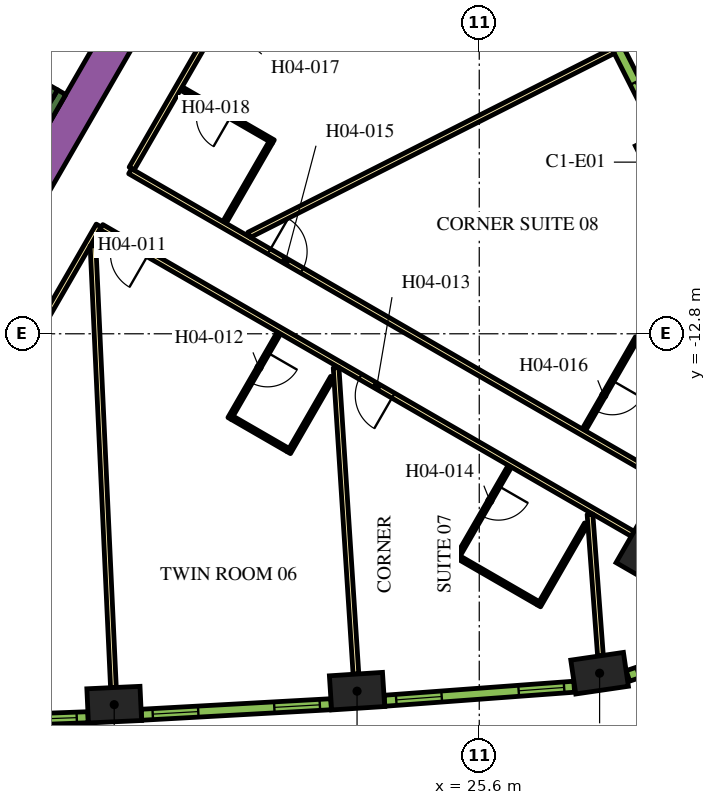
"""IFC4 building model, lengths in metres.
Left out: names, types, materials, properties, quantities, classifications, styles, units other than length and angle.
Written with IfcOpenShell. Run it as: python <this file> out.ifc"""

import sys

from ifc_helpers import new_model, si_unit, direction, frame, frame_2d, origin, origin_2d, place, context, subcontext, project, spatial, rectangle, extrude, element, fill, save


model = new_model("IFC4")
c1 = context("Model", 3, precision=1e-05, world=origin(), true_north=direction((0.0, 1.0)))
c2 = subcontext(c1, "Body", "Model", "MODEL_VIEW")
j1 = project(units=[si_unit("LENGTHUNIT", "METRE"), si_unit("PLANEANGLEUNIT", "RADIAN")], contexts=[c1])
p1 = place(None, origin())
s1 = spatial("IfcSite", under=j1, at=p1, CompositionType="ELEMENT")
p2 = place(p1, origin())
s2 = spatial("IfcBuilding", under=s1, at=p2, CompositionType="ELEMENT")
p3 = place(p2, frame((0.0, 0.0, 66.6)))
s3 = spatial("IfcBuildingStorey", under=s2, at=p3, CompositionType="ELEMENT", Elevation=66.6)
p4 = place(p3, frame((31.522, -18.199, 0.0), z_axis=(0.0, 0.0, 1.0), x_axis=(0.866025403784, -0.5, 0.0)))
e1 = element("IfcColumn", 1, at=p4, inside=s3, PredefinedType="COLUMN", context=c2, shape_type="SweptSolid", body=[
    extrude(rectangle(XDim=3.4, YDim=3.4, at=origin_2d()), origin(), (0.0, 0.0, 1.0), 3.9),
])
for number, where, z_axis, x_axis in (
    (2, (15.994, -22.558, 0.0), (0.0, 0.0, 1.0), (0.999, 0.046, 0.0)),
    (3, (22.385, -22.204, 0.0), (0.0, 0.0, 1.0), (0.998, 0.065, 0.0)),
    (4, (28.767, -21.731, 0.0), (0.0, 0.0, 1.0), (0.989, 0.145, 0.0)),
    (5, (30.421, -8.284, 0.0), (0.0, 0.0, 1.0), (-0.443, 0.897, 0.0)),
):
    element("IfcColumn", number, at=place(p3, frame(where, z_axis=z_axis, x_axis=x_axis)), inside=s3, PredefinedType="COLUMN", context=c2, shape_type="SweptSolid", body=[
        extrude(rectangle(XDim=1.4, YDim=0.9, at=origin_2d()), origin(), (0.0, 0.0, 1.0), 3.9),
    ])
p5 = place(p3, frame((11.695, -12.644, 0.0), z_axis=(0.0, 0.0, 1.0), x_axis=(0.500010229568, 0.86601949766, 0.0)))
e6 = element("IfcWall", 6, at=p5, inside=s3, PredefinedType="SOLIDWALL", context=c2, shape_type="SweptSolid", body=[
    extrude(rectangle(XDim=9.326, YDim=0.9, at=frame_2d((4.663, 0.0))), origin(), (0.0, 0.0, 1.0), 3.9),
])
p6 = place(p3, frame((12.885, -9.431, 0.0), z_axis=(0.0, 0.0, 1.0), x_axis=(0.500020560727, 0.866013532718, 0.0)))
e7 = element("IfcWall", 7, at=p6, inside=s3, PredefinedType="SOLIDWALL", context=c2, shape_type="SweptSolid", body=[
    extrude(rectangle(XDim=3.45, YDim=0.25, at=frame_2d((1.725, 0.0))), origin(), (0.0, 0.0, 1.0), 3.9),
])
p7 = place(p3, frame((8.334, -2.964, 0.0), z_axis=(0.0, 0.0, 1.0), x_axis=(0.866016039709, -0.500016218704, 0.0)))
e8 = element("IfcWall", 8, at=p7, inside=s3, PredefinedType="SOLIDWALL", context=c2, shape_type="SweptSolid", body=[
    extrude(rectangle(XDim=7.05, YDim=0.25, at=frame_2d((3.525, 0.0))), origin(), (0.0, 0.0, 1.0), 3.9),
])
p8 = place(p3, frame((16.412, -8.523, 0.0), z_axis=(0.0, 0.0, 1.0), x_axis=(0.866022197818, -0.500005552856, 0.0)))
e9 = element("IfcWall", 9, at=p8, inside=s3, PredefinedType="PARTITIONING", context=c2, shape_type="SweptSolid", body=[
    extrude(rectangle(XDim=16.224, YDim=0.15, at=frame_2d((8.112, 0.0))), origin(), (0.0, 0.0, 1.0), 2.75),
])
p9 = place(p8, frame((4.223, 0.0, 0.0)))
e10 = element("IfcOpeningElement", 10, at=p9, cuts=e9, PredefinedType="OPENING", context=c2, shape_type="SweptSolid", body=[
    extrude(rectangle(XDim=1.0, YDim=2.1, at=frame_2d((0.5, 1.05))), frame((0.0, 0.085, 0.0), z_axis=(0.0, -1.0, 0.0), x_axis=(1.0, 0.0, 0.0)), (0.0, 0.0, 1.0), 0.17),
])
p10 = place(p3, frame((19.081, -3.9, 0.0), z_axis=(0.0, 0.0, 1.0), x_axis=(-0.499974327079, -0.866040225545, 0.0)))
e11 = element("IfcWall", 11, at=p10, inside=s3, PredefinedType="PARTITIONING", context=c2, shape_type="SweptSolid", body=[
    extrude(rectangle(XDim=5.258, YDim=0.15, at=frame_2d((2.629, 0.0))), origin(), (0.0, 0.0, 1.0), 2.75),
])
p11 = place(p10, frame((0.18, 0.0, 0.0)))
e12 = element("IfcOpeningElement", 12, at=p11, cuts=e11, PredefinedType="OPENING", context=c2, shape_type="SweptSolid", body=[
    extrude(rectangle(XDim=1.0, YDim=2.1, at=frame_2d((0.5, 1.05))), frame((0.0, 0.085, 0.0), z_axis=(0.0, -1.0, 0.0), x_axis=(1.0, 0.0, 0.0)), (0.0, 0.0, 1.0), 0.17),
])
p12 = place(p3, frame((15.587, -9.952, 0.0), z_axis=(0.0, 0.0, 1.0), x_axis=(-0.500016618951, -0.866015808616, 0.0)))
e13 = element("IfcWall", 13, at=p12, inside=s3, PredefinedType="PARTITIONING", context=c2, shape_type="SweptSolid", body=[
    extrude(rectangle(XDim=5.268, YDim=0.15, at=frame_2d((2.634, 0.0))), origin(), (0.0, 0.0, 1.0), 2.75),
])
p13 = place(p3, frame((29.638, -18.064, 0.0), z_axis=(0.0, 0.0, 1.0), x_axis=(-0.866026175601, 0.499998663172, 0.0)))
e14 = element("IfcWall", 14, at=p13, inside=s3, PredefinedType="PARTITIONING", context=c2, shape_type="SweptSolid", body=[
    extrude(rectangle(XDim=16.144, YDim=0.15, at=frame_2d((8.072, 0.0))), origin(), (0.0, 0.0, 1.0), 2.75),
])
p14 = place(p13, frame((14.714, 0.0, 0.0)))
e15 = element("IfcOpeningElement", 15, at=p14, cuts=e14, PredefinedType="OPENING", context=c2, shape_type="SweptSolid", body=[
    extrude(rectangle(XDim=1.0, YDim=2.1, at=frame_2d((0.5, 1.05))), frame((0.0, 0.085, 0.0), z_axis=(0.0, -1.0, 0.0), x_axis=(1.0, 0.0, 0.0)), (0.0, 0.0, 1.0), 0.17),
])
p15 = place(p13, frame((7.275, 0.0, 0.0)))
e16 = element("IfcOpeningElement", 16, at=p15, cuts=e14, PredefinedType="OPENING", context=c2, shape_type="SweptSolid", body=[
    extrude(rectangle(XDim=1.0, YDim=2.1, at=frame_2d((0.5, 1.05))), frame((0.0, 0.085, 0.0), z_axis=(0.0, -1.0, 0.0), x_axis=(1.0, 0.0, 0.0)), (0.0, 0.0, 1.0), 0.17),
])
p16 = place(p3, frame((15.973, -22.109, 0.0), z_axis=(0.0, 0.0, 1.0), x_axis=(-0.046191717129, 0.998932592955, 0.0)))
e17 = element("IfcWall", 17, at=p16, inside=s3, PredefinedType="PARTITIONING", context=c2, shape_type="SweptSolid", body=[
    extrude(rectangle(XDim=11.638, YDim=0.15, at=frame_2d((5.819, 0.0))), origin(), (0.0, 0.0, 1.0), 2.75),
])
p17 = place(p3, frame((29.12, -5.356, 0.0), z_axis=(0.0, 0.0, 1.0), x_axis=(-0.892401965553, -0.451241323327, 0.0)))
e18 = element("IfcWall", 18, at=p17, inside=s3, PredefinedType="PARTITIONING", context=c2, shape_type="SweptSolid", body=[
    extrude(rectangle(XDim=10.729, YDim=0.15, at=frame_2d((5.364, 0.0))), origin(), (0.0, 0.0, 1.0), 2.75),
])
p18 = place(p3, frame((22.355, -21.754, 0.0), z_axis=(0.0, 0.0, 1.0), x_axis=(-0.064639533143, 0.997908678565, 0.0)))
e19 = element("IfcWall", 19, at=p18, inside=s3, PredefinedType="PARTITIONING", context=c2, shape_type="SweptSolid", body=[
    extrude(rectangle(XDim=8.079, YDim=0.15, at=frame_2d((4.04, 0.0))), origin(), (0.0, 0.0, 1.0), 2.75),
])
p19 = place(p3, frame((28.79, -21.273, 0.0), z_axis=(0.0, 0.0, 1.0), x_axis=(-0.07382592098, 0.997271143366, 0.0)))
e20 = element("IfcWall", 20, at=p19, inside=s3, PredefinedType="PARTITIONING", context=c2, shape_type="SweptSolid", body=[
    extrude(rectangle(XDim=3.734, YDim=0.15, at=frame_2d((1.867, 0.0))), origin(), (0.0, 0.0, 1.0), 2.75),
])
p20 = place(p3, frame((20.33, -12.777, 0.0), z_axis=(0.0, 0.0, 1.0), x_axis=(-0.500006934395, -0.866021400173, 0.0)))
e21 = element("IfcWall", 21, at=p20, inside=s3, PredefinedType="PARTITIONING", context=c2, shape_type="SweptSolid", body=[
    extrude(rectangle(XDim=2.6, YDim=0.1, at=frame_2d((1.3, 0.0))), origin(), (0.0, 0.0, 1.0), 2.75),
])
p21 = place(p20, frame((0.6, 0.0, 0.0)))
e22 = element("IfcOpeningElement", 22, at=p21, cuts=e21, PredefinedType="OPENING", context=c2, shape_type="SweptSolid", body=[
    extrude(rectangle(XDim=0.9, YDim=2.1, at=frame_2d((0.45, 1.05))), frame((0.0, 0.06, 0.0), z_axis=(0.0, -1.0, 0.0), x_axis=(1.0, 0.0, 0.0)), (0.0, 0.0, 1.0), 0.12),
])
p22 = place(p3, frame((19.098, -15.01, 0.0), z_axis=(0.0, 0.0, 1.0), x_axis=(0.86605165483, -0.499954529098, 0.0)))
e23 = element("IfcWall", 23, at=p22, inside=s3, PredefinedType="PARTITIONING", context=c2, shape_type="SweptSolid", body=[
    extrude(rectangle(XDim=1.7, YDim=0.1, at=frame_2d((0.85, 0.0))), origin(), (0.0, 0.0, 1.0), 2.75),
])
p23 = place(p3, frame((21.734, -13.945, 0.0), z_axis=(0.0, 0.0, 1.0), x_axis=(-0.500014693593, -0.866016920268, 0.0)))
e24 = element("IfcWall", 24, at=p23, inside=s3, PredefinedType="PARTITIONING", context=c2, shape_type="SweptSolid", body=[
    extrude(rectangle(XDim=2.29, YDim=0.1, at=frame_2d((1.145, 0.0))), origin(), (0.0, 0.0, 1.0), 2.75),
])
p24 = place(p3, frame((26.405, -16.284, 0.0), z_axis=(0.0, 0.0, 1.0), x_axis=(-0.49998411664, -0.866034573852, 0.0)))
e25 = element("IfcWall", 25, at=p24, inside=s3, PredefinedType="PARTITIONING", context=c2, shape_type="SweptSolid", body=[
    extrude(rectangle(XDim=2.8, YDim=0.1, at=frame_2d((1.4, 0.0))), origin(), (0.0, 0.0, 1.0), 2.75),
])
p25 = place(p24, frame((0.6, 0.0, 0.0)))
e26 = element("IfcOpeningElement", 26, at=p25, cuts=e25, PredefinedType="OPENING", context=c2, shape_type="SweptSolid", body=[
    extrude(rectangle(XDim=0.9, YDim=2.1, at=frame_2d((0.45, 1.05))), frame((0.0, 0.06, 0.0), z_axis=(0.0, -1.0, 0.0), x_axis=(1.0, 0.0, 0.0)), (0.0, 0.0, 1.0), 0.12),
])
p26 = place(p3, frame((25.073, -18.691, 0.0), z_axis=(0.0, 0.0, 1.0), x_axis=(0.866024647952, -0.500001309137, 0.0)))
e27 = element("IfcWall", 27, at=p26, inside=s3, PredefinedType="PARTITIONING", context=c2, shape_type="SweptSolid", body=[
    extrude(rectangle(XDim=2.4, YDim=0.1, at=frame_2d((1.2, 0.0))), origin(), (0.0, 0.0, 1.0), 2.75),
])
p27 = place(p3, frame((28.415, -17.802, 0.0), z_axis=(0.0, 0.0, 1.0), x_axis=(-0.499945955465, -0.866056604163, 0.0)))
e28 = element("IfcWall", 28, at=p27, inside=s3, PredefinedType="PARTITIONING", context=c2, shape_type="SweptSolid", body=[
    extrude(rectangle(XDim=2.49, YDim=0.1, at=frame_2d((1.245, 0.0))), origin(), (0.0, 0.0, 1.0), 2.75),
])
p28 = place(p3, frame((29.752, -12.905, 0.0), z_axis=(0.0, 0.0, 1.0), x_axis=(-0.500049511043, -0.865996816683, 0.0)))
e29 = element("IfcWall", 29, at=p28, inside=s3, PredefinedType="PARTITIONING", context=c2, shape_type="SweptSolid", body=[
    extrude(rectangle(XDim=2.8, YDim=0.1, at=frame_2d((1.4, 0.0))), origin(), (0.0, 0.0, 1.0), 2.75),
])
p29 = place(p28, frame((1.3, 0.0, 0.0)))
e30 = element("IfcOpeningElement", 30, at=p29, cuts=e29, PredefinedType="OPENING", context=c2, shape_type="SweptSolid", body=[
    extrude(rectangle(XDim=0.9, YDim=2.1, at=frame_2d((0.45, 1.05))), frame((0.0, 0.06, 0.0), z_axis=(0.0, -1.0, 0.0), x_axis=(1.0, 0.0, 0.0)), (0.0, 0.0, 1.0), 0.12),
])
p30 = place(p3, frame((20.182, -7.743, 0.0), z_axis=(0.0, 0.0, 1.0), x_axis=(-0.866034573852, 0.49998411664, 0.0)))
e31 = element("IfcWall", 31, at=p30, inside=s3, PredefinedType="PARTITIONING", context=c2, shape_type="SweptSolid", body=[
    extrude(rectangle(XDim=2.8, YDim=0.1, at=frame_2d((1.4, 0.0))), origin(), (0.0, 0.0, 1.0), 2.75),
])
p31 = place(p30, frame((1.3, 0.0, 0.0)))
e32 = element("IfcOpeningElement", 32, at=p31, cuts=e31, PredefinedType="OPENING", context=c2, shape_type="SweptSolid", body=[
    extrude(rectangle(XDim=0.9, YDim=2.1, at=frame_2d((0.45, 1.05))), frame((0.0, 0.06, 0.0), z_axis=(0.0, -1.0, 0.0), x_axis=(1.0, 0.0, 0.0)), (0.0, 0.0, 1.0), 0.12),
])
p32 = place(p3, frame((20.109, -7.771, 0.0), z_axis=(0.0, 0.0, 1.0), x_axis=(-0.500077573772, -0.865980611914, 0.0)))
e33 = element("IfcWall", 33, at=p32, inside=s3, PredefinedType="PARTITIONING", context=c2, shape_type="SweptSolid", body=[
    extrude(rectangle(XDim=2.42, YDim=0.1, at=frame_2d((1.21, 0.0))), origin(), (0.0, 0.0, 1.0), 2.75),
])
p33 = place(p3, frame((10.31, -23.074, 0.0), z_axis=(0.0, 0.0, 1.0), x_axis=(0.999317974969, 0.036926750529, 0.0)))
e34 = element("IfcWall", 34, at=p33, inside=s3, PredefinedType="SOLIDWALL", context=c2, shape_type="SweptSolid", body=[
    extrude(rectangle(XDim=4.998, YDim=0.29, at=frame_2d((2.499, 0.0))), origin(), (0.0, 0.0, 1.0), 3.65),
])
p34 = place(p33, frame((0.297, 0.0, 0.9)))
e35 = element("IfcOpeningElement", 35, at=p34, cuts=e34, PredefinedType="OPENING", context=c2, shape_type="SweptSolid", body=[
    extrude(rectangle(XDim=1.2, YDim=2.15, at=frame_2d((0.6, 1.075))), frame((0.0, 0.155, 0.0), z_axis=(0.0, -1.0, 0.0), x_axis=(1.0, 0.0, 0.0)), (0.0, 0.0, 1.0), 0.31),
])
p35 = place(p33, frame((3.501, 0.0, 0.9)))
e36 = element("IfcOpeningElement", 36, at=p35, cuts=e34, PredefinedType="OPENING", context=c2, shape_type="SweptSolid", body=[
    extrude(rectangle(XDim=1.2, YDim=2.15, at=frame_2d((0.6, 1.075))), frame((0.0, 0.155, 0.0), z_axis=(0.0, -1.0, 0.0), x_axis=(1.0, 0.0, 0.0)), (0.0, 0.0, 1.0), 0.31),
])
p36 = place(p3, frame((16.711, -22.824, 0.0), z_axis=(0.0, 0.0, 1.0), x_axis=(0.998464708705, 0.055391564976, 0.0)))
e37 = element("IfcWall", 37, at=p36, inside=s3, PredefinedType="SOLIDWALL", context=c2, shape_type="SweptSolid", body=[
    extrude(rectangle(XDim=4.998, YDim=0.29, at=frame_2d((2.499, 0.0))), origin(), (0.0, 0.0, 1.0), 3.65),
])
p37 = place(p36, frame((0.297, 0.0, 0.9)))
e38 = element("IfcOpeningElement", 38, at=p37, cuts=e37, PredefinedType="OPENING", context=c2, shape_type="SweptSolid", body=[
    extrude(rectangle(XDim=1.2, YDim=2.15, at=frame_2d((0.6, 1.075))), frame((0.0, 0.155, 0.0), z_axis=(0.0, -1.0, 0.0), x_axis=(1.0, 0.0, 0.0)), (0.0, 0.0, 1.0), 0.31),
])
p38 = place(p36, frame((3.501, 0.0, 0.9)))
e39 = element("IfcOpeningElement", 39, at=p38, cuts=e37, PredefinedType="OPENING", context=c2, shape_type="SweptSolid", body=[
    extrude(rectangle(XDim=1.2, YDim=2.15, at=frame_2d((0.6, 1.075))), frame((0.0, 0.155, 0.0), z_axis=(0.0, -1.0, 0.0), x_axis=(1.0, 0.0, 0.0)), (0.0, 0.0, 1.0), 0.31),
])
p39 = place(p3, frame((23.106, -22.456, 0.0), z_axis=(0.0, 0.0, 1.0), x_axis=(0.997266290399, 0.073891447643, 0.0)))
e40 = element("IfcWall", 40, at=p39, inside=s3, PredefinedType="SOLIDWALL", context=c2, shape_type="SweptSolid", body=[
    extrude(rectangle(XDim=5.006, YDim=0.29, at=frame_2d((2.503, 0.0))), origin(), (0.0, 0.0, 1.0), 3.65),
])
p40 = place(p39, frame((0.31, 0.0, 0.9)))
e41 = element("IfcOpeningElement", 41, at=p40, cuts=e40, PredefinedType="OPENING", context=c2, shape_type="SweptSolid", body=[
    extrude(rectangle(XDim=1.2, YDim=2.15, at=frame_2d((0.6, 1.075))), frame((0.0, 0.155, 0.0), z_axis=(0.0, -1.0, 0.0), x_axis=(1.0, 0.0, 0.0)), (0.0, 0.0, 1.0), 0.31),
])
p41 = place(p39, frame((3.54, 0.0, 0.9)))
e42 = element("IfcOpeningElement", 42, at=p41, cuts=e40, PredefinedType="OPENING", context=c2, shape_type="SweptSolid", body=[
    extrude(rectangle(XDim=1.2, YDim=2.15, at=frame_2d((0.6, 1.075))), frame((0.0, 0.155, 0.0), z_axis=(0.0, -1.0, 0.0), x_axis=(1.0, 0.0, 0.0)), (0.0, 0.0, 1.0), 0.31),
])
p42 = place(p3, frame((29.512, -21.802, 0.0), z_axis=(0.0, 0.0, 1.0), x_axis=(0.947903891592, 0.318556450734, 0.0)))
e43 = element("IfcWall", 43, at=p42, inside=s3, PredefinedType="SOLIDWALL", context=c2, shape_type="SweptSolid", body=[
    extrude(rectangle(XDim=1.415, YDim=0.29, at=frame_2d((0.708, 0.0))), origin(), (0.0, 0.0, 1.0), 3.65),
])
p43 = place(p42, frame((0.257, 0.0, 0.9)))
e44 = element("IfcOpeningElement", 44, at=p43, cuts=e43, PredefinedType="OPENING", context=c2, shape_type="SweptSolid", body=[
    extrude(rectangle(XDim=0.9, YDim=2.15, at=frame_2d((0.45, 1.075))), frame((0.0, 0.155, 0.0), z_axis=(0.0, -1.0, 0.0), x_axis=(1.0, 0.0, 0.0)), (0.0, 0.0, 1.0), 0.31),
])
p44 = place(p3, frame((30.377, -7.521, 0.0), z_axis=(0.0, 0.0, 1.0), x_axis=(-0.451233929645, 0.892405704115, 0.0)))
e45 = element("IfcWall", 45, at=p44, inside=s3, PredefinedType="SOLIDWALL", context=c2, shape_type="SweptSolid", body=[
    extrude(rectangle(XDim=4.998, YDim=0.29, at=frame_2d((2.499, 0.0))), origin(), (0.0, 0.0, 1.0), 3.65),
])
p45 = place(p44, frame((0.297, 0.0, 0.9)))
e46 = element("IfcOpeningElement", 46, at=p45, cuts=e45, PredefinedType="OPENING", context=c2, shape_type="SweptSolid", body=[
    extrude(rectangle(XDim=1.2, YDim=2.15, at=frame_2d((0.6, 1.075))), frame((0.0, 0.155, 0.0), z_axis=(0.0, -1.0, 0.0), x_axis=(1.0, 0.0, 0.0)), (0.0, 0.0, 1.0), 0.31),
])
p46 = place(p44, frame((3.501, 0.0, 0.9)))
e47 = element("IfcOpeningElement", 47, at=p46, cuts=e45, PredefinedType="OPENING", context=c2, shape_type="SweptSolid", body=[
    extrude(rectangle(XDim=1.2, YDim=2.15, at=frame_2d((0.6, 1.075))), frame((0.0, 0.155, 0.0), z_axis=(0.0, -1.0, 0.0), x_axis=(1.0, 0.0, 0.0)), (0.0, 0.0, 1.0), 0.31),
])
p47 = place(p14, origin())
e48 = element("IfcDoor", 48, at=p47, inside=s3, OperationType="SINGLE_SWING_RIGHT", PredefinedType="DOOR", context=c2, shape_type="SweptSolid", body=[
    extrude(rectangle(XDim=1.0, YDim=2.1, at=frame_2d((0.5, 1.05))), frame((0.0, 0.025, 0.0), z_axis=(0.0, -1.0, 0.0), x_axis=(1.0, 0.0, 0.0)), (0.0, 0.0, 1.0), 0.05),
])
fill(e15, e48)
p48 = place(p21, origin())
e49 = element("IfcDoor", 49, at=p48, inside=s3, OperationType="SINGLE_SWING_RIGHT", PredefinedType="DOOR", context=c2, shape_type="SweptSolid", body=[
    extrude(rectangle(XDim=0.9, YDim=2.1, at=frame_2d((0.45, 1.05))), frame((0.0, 0.025, 0.0), z_axis=(0.0, -1.0, 0.0), x_axis=(1.0, 0.0, 0.0)), (0.0, 0.0, 1.0), 0.05),
])
fill(e22, e49)
p49 = place(p15, origin())
e50 = element("IfcDoor", 50, at=p49, inside=s3, OperationType="SINGLE_SWING_RIGHT", PredefinedType="DOOR", context=c2, shape_type="SweptSolid", body=[
    extrude(rectangle(XDim=1.0, YDim=2.1, at=frame_2d((0.5, 1.05))), frame((0.0, 0.025, 0.0), z_axis=(0.0, -1.0, 0.0), x_axis=(1.0, 0.0, 0.0)), (0.0, 0.0, 1.0), 0.05),
])
fill(e16, e50)
p50 = place(p25, origin())
e51 = element("IfcDoor", 51, at=p50, inside=s3, OperationType="SINGLE_SWING_LEFT", PredefinedType="DOOR", context=c2, shape_type="SweptSolid", body=[
    extrude(rectangle(XDim=0.9, YDim=2.1, at=frame_2d((0.45, 1.05))), frame((0.0, 0.025, 0.0), z_axis=(0.0, -1.0, 0.0), x_axis=(1.0, 0.0, 0.0)), (0.0, 0.0, 1.0), 0.05),
])
fill(e26, e51)
p51 = place(p9, origin())
e52 = element("IfcDoor", 52, at=p51, inside=s3, OperationType="SINGLE_SWING_LEFT", PredefinedType="DOOR", context=c2, shape_type="SweptSolid", body=[
    extrude(rectangle(XDim=1.0, YDim=2.1, at=frame_2d((0.5, 1.05))), frame((0.0, 0.025, 0.0), z_axis=(0.0, -1.0, 0.0), x_axis=(1.0, 0.0, 0.0)), (0.0, 0.0, 1.0), 0.05),
])
fill(e10, e52)
p52 = place(p29, origin())
e53 = element("IfcDoor", 53, at=p52, inside=s3, OperationType="SINGLE_SWING_LEFT", PredefinedType="DOOR", context=c2, shape_type="SweptSolid", body=[
    extrude(rectangle(XDim=0.9, YDim=2.1, at=frame_2d((0.45, 1.05))), frame((0.0, 0.025, 0.0), z_axis=(0.0, -1.0, 0.0), x_axis=(1.0, 0.0, 0.0)), (0.0, 0.0, 1.0), 0.05),
])
fill(e30, e53)
p53 = place(p31, origin())
e54 = element("IfcDoor", 54, at=p53, inside=s3, OperationType="SINGLE_SWING_RIGHT", PredefinedType="DOOR", context=c2, shape_type="SweptSolid", body=[
    extrude(rectangle(XDim=0.9, YDim=2.1, at=frame_2d((0.45, 1.05))), frame((0.0, 0.025, 0.0), z_axis=(0.0, -1.0, 0.0), x_axis=(1.0, 0.0, 0.0)), (0.0, 0.0, 1.0), 0.05),
])
fill(e32, e54)
p54 = place(p35, origin())
e55 = element("IfcWindow", 55, at=p54, inside=s3, PartitioningType="DOUBLE_PANEL_VERTICAL", PredefinedType="WINDOW", context=c2, shape_type="SweptSolid", body=[
    extrude(rectangle(XDim=1.2, YDim=2.15, at=frame_2d((0.6, 1.075))), frame((0.0, 0.015, 0.0), z_axis=(0.0, -1.0, 0.0), x_axis=(1.0, 0.0, 0.0)), (0.0, 0.0, 1.0), 0.06),
])
fill(e36, e55)
p55 = place(p37, origin())
e56 = element("IfcWindow", 56, at=p55, inside=s3, PartitioningType="DOUBLE_PANEL_VERTICAL", PredefinedType="WINDOW", context=c2, shape_type="SweptSolid", body=[
    extrude(rectangle(XDim=1.2, YDim=2.15, at=frame_2d((0.6, 1.075))), frame((0.0, 0.015, 0.0), z_axis=(0.0, -1.0, 0.0), x_axis=(1.0, 0.0, 0.0)), (0.0, 0.0, 1.0), 0.06),
])
fill(e38, e56)
p56 = place(p38, origin())
e57 = element("IfcWindow", 57, at=p56, inside=s3, PartitioningType="DOUBLE_PANEL_VERTICAL", PredefinedType="WINDOW", context=c2, shape_type="SweptSolid", body=[
    extrude(rectangle(XDim=1.2, YDim=2.15, at=frame_2d((0.6, 1.075))), frame((0.0, 0.015, 0.0), z_axis=(0.0, -1.0, 0.0), x_axis=(1.0, 0.0, 0.0)), (0.0, 0.0, 1.0), 0.06),
])
fill(e39, e57)
p57 = place(p40, origin())
e58 = element("IfcWindow", 58, at=p57, inside=s3, PartitioningType="DOUBLE_PANEL_VERTICAL", PredefinedType="WINDOW", context=c2, shape_type="SweptSolid", body=[
    extrude(rectangle(XDim=1.2, YDim=2.15, at=frame_2d((0.6, 1.075))), frame((0.0, 0.015, 0.0), z_axis=(0.0, -1.0, 0.0), x_axis=(1.0, 0.0, 0.0)), (0.0, 0.0, 1.0), 0.06),
])
fill(e41, e58)
p58 = place(p41, origin())
e59 = element("IfcWindow", 59, at=p58, inside=s3, PartitioningType="DOUBLE_PANEL_VERTICAL", PredefinedType="WINDOW", context=c2, shape_type="SweptSolid", body=[
    extrude(rectangle(XDim=1.2, YDim=2.15, at=frame_2d((0.6, 1.075))), frame((0.0, 0.015, 0.0), z_axis=(0.0, -1.0, 0.0), x_axis=(1.0, 0.0, 0.0)), (0.0, 0.0, 1.0), 0.06),
])
fill(e42, e59)
p59 = place(p45, origin())
e60 = element("IfcWindow", 60, at=p59, inside=s3, PartitioningType="DOUBLE_PANEL_VERTICAL", PredefinedType="WINDOW", context=c2, shape_type="SweptSolid", body=[
    extrude(rectangle(XDim=1.2, YDim=2.15, at=frame_2d((0.6, 1.075))), frame((0.0, 0.015, 0.0), z_axis=(0.0, -1.0, 0.0), x_axis=(1.0, 0.0, 0.0)), (0.0, 0.0, 1.0), 0.06),
])
fill(e46, e60)
save(model, sys.argv[1])
